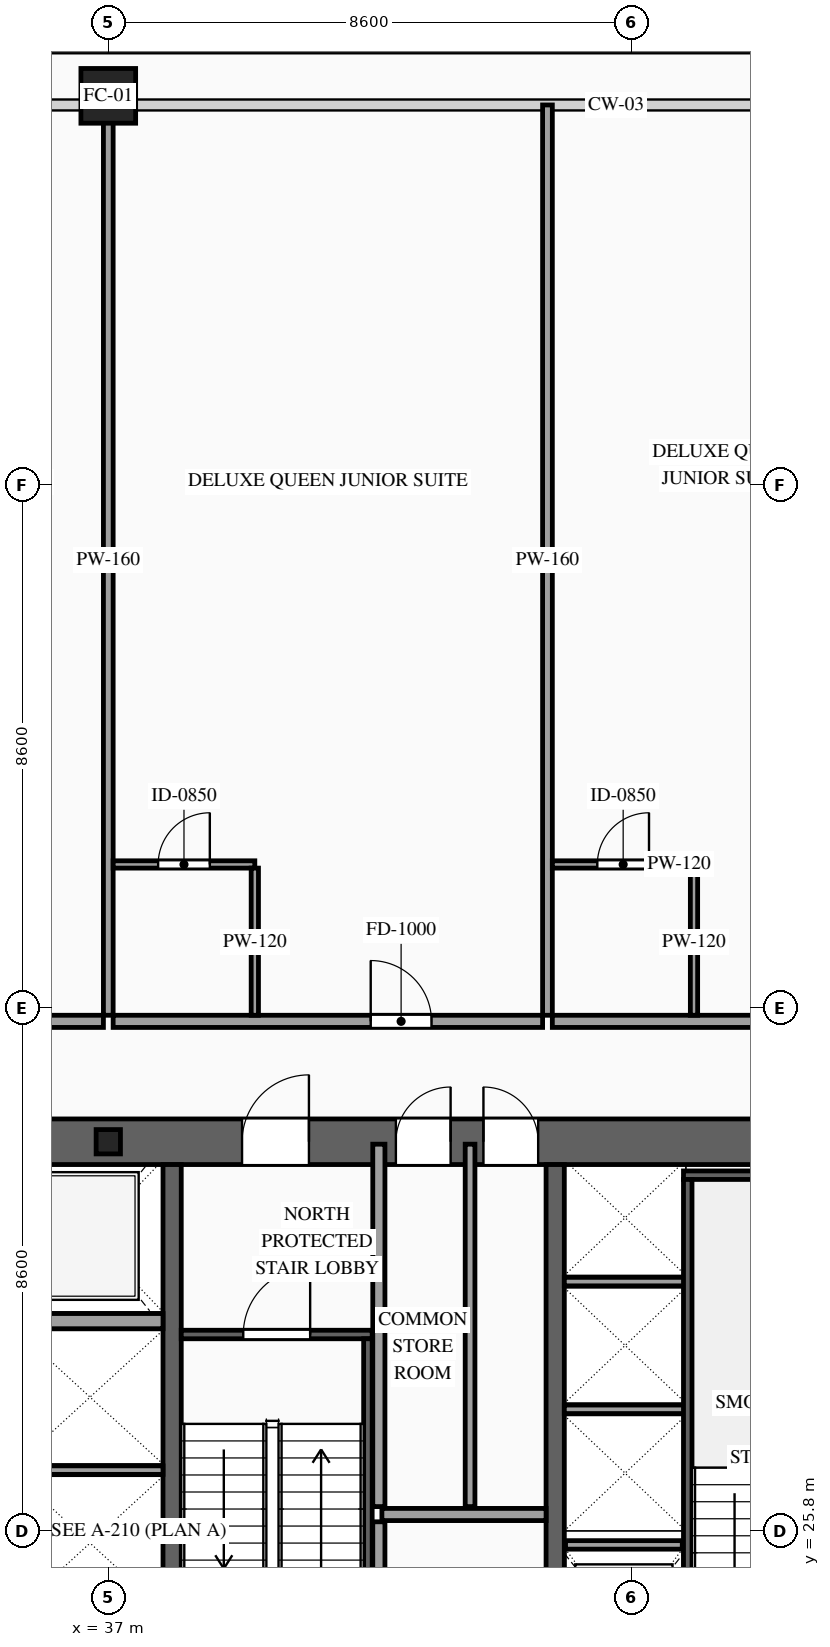
"""IFC4 building model, lengths in metres.
Left out: names, types, materials, properties, quantities, classifications, styles, units other than length and angle.
Written with IfcOpenShell. Run it as: python <this file> out.ifc"""

import sys

from ifc_helpers import new_model, si_unit, direction, frame, frame_2d, origin, origin_2d, place, context, subcontext, project, spatial, rectangle, hollow_rectangle, i_section, extrude, source, transform, mapped, element, fill, save


model = new_model("IFC4")
c1 = context("Model", 3, precision=1e-05, world=origin(), true_north=direction((0.0, 1.0)))
c2 = subcontext(c1, "Body", "Model", "MODEL_VIEW")
j1 = project(units=[si_unit("LENGTHUNIT", "METRE"), si_unit("PLANEANGLEUNIT", "RADIAN")], contexts=[c1])
p1 = place(None, origin())
s1 = spatial("IfcSite", under=j1, at=p1, CompositionType="ELEMENT")
p2 = place(p1, origin())
s2 = spatial("IfcBuilding", under=s1, at=p2, CompositionType="ELEMENT")
p3 = place(p2, frame((0.0, 0.0, 159.6)))
s3 = spatial("IfcBuildingStorey", under=s2, at=p3, CompositionType="ELEMENT", Elevation=159.6)
p4 = place(p3, frame((23.425, 32.2, 0.0), z_axis=(0.0, 0.0, 1.0), x_axis=(1.0, 0.0, 0.0)))
e1 = element("IfcWall", 1, at=p4, inside=s3, PredefinedType="SHEAR", context=c2, shape_type="SweptSolid", body=[
    extrude(rectangle(XDim=27.15, YDim=0.75, at=frame_2d((13.575, 0.0))), origin(), (0.0, 0.0, 1.0), 3.6),
])
p5 = place(p4, frame((4.645, 0.0, 0.0)))
e2 = element("IfcOpeningElement", 2, at=p5, cuts=e1, PredefinedType="OPENING", context=c2, shape_type="SweptSolid", body=[
    extrude(rectangle(XDim=0.9, YDim=2.15, at=frame_2d((0.45, 1.075))), frame((0.0, 0.39, 0.0), z_axis=(0.0, -1.0, 0.0), x_axis=(1.0, 0.0, 0.0)), (0.0, 0.0, 1.0), 0.78),
])
p6 = place(p4, frame((9.925, 0.0, 0.0)))
e3 = element("IfcOpeningElement", 3, at=p6, cuts=e1, PredefinedType="OPENING", context=c2, shape_type="SweptSolid", body=[
    extrude(rectangle(XDim=1.1, YDim=2.2, at=frame_2d((0.55, 1.1))), frame((0.0, 0.39, 0.0), z_axis=(0.0, -1.0, 0.0), x_axis=(1.0, 0.0, 0.0)), (0.0, 0.0, 1.0), 0.78),
])
p7 = place(p4, frame((15.775, 0.0, 0.0)))
e4 = element("IfcOpeningElement", 4, at=p7, cuts=e1, PredefinedType="OPENING", context=c2, shape_type="SweptSolid", body=[
    extrude(rectangle(XDim=1.1, YDim=2.2, at=frame_2d((0.55, 1.1))), frame((0.0, 0.39, 0.0), z_axis=(0.0, -1.0, 0.0), x_axis=(1.0, 0.0, 0.0)), (0.0, 0.0, 1.0), 0.78),
])
p8 = place(p4, frame((18.305, 0.0, 0.0)))
e5 = element("IfcOpeningElement", 5, at=p8, cuts=e1, PredefinedType="OPENING", context=c2, shape_type="SweptSolid", body=[
    extrude(rectangle(XDim=0.9, YDim=2.15, at=frame_2d((0.45, 1.075))), frame((0.0, 0.39, 0.0), z_axis=(0.0, -1.0, 0.0), x_axis=(1.0, 0.0, 0.0)), (0.0, 0.0, 1.0), 0.78),
])
p9 = place(p4, frame((19.745, 0.0, 0.0)))
e6 = element("IfcOpeningElement", 6, at=p9, cuts=e1, PredefinedType="OPENING", context=c2, shape_type="SweptSolid", body=[
    extrude(rectangle(XDim=0.9, YDim=2.15, at=frame_2d((0.45, 1.075))), frame((0.0, 0.39, 0.0), z_axis=(0.0, -1.0, 0.0), x_axis=(1.0, 0.0, 0.0)), (0.0, 0.0, 1.0), 0.78),
])
m1 = source(origin(), c2, "Body", "SweptSolid", [
    extrude(rectangle(XDim=12.05, YDim=0.3, at=frame_2d((6.025, 0.0))), origin(), (0.0, 0.0, 1.0), 3.6),
])
for number, where, z_axis, x_axis in (
    (7, (38.05, 19.775, 0.0), (0.0, 0.0, 1.0), (0.0, 1.0, 0.0)),
    (8, (44.35, 19.775, 0.0), (0.0, 0.0, 1.0), (0.0, 1.0, 0.0)),
):
    element("IfcWall", number, at=place(p3, frame(where, z_axis=z_axis, x_axis=x_axis)), inside=s3, PredefinedType="SOLIDWALL", context=c2, shape_type="MappedRepresentation", body=[
        mapped(m1, transform((0.0, 0.0, 0.0), scale=1.0)),
    ])
m2 = source(origin(), c2, "Body", "SweptSolid", [
    extrude(i_section(OverallWidth=0.4, OverallDepth=0.4, WebThickness=0.013, FlangeThickness=0.021, at=origin_2d()), origin(), (0.0, 0.0, 1.0), 3.6),
])
p10 = place(p3, frame((37.0, 32.2, 0.0), z_axis=(0.0, 0.0, 1.0), x_axis=(1.0, 0.0, 0.0)))
e9 = element("IfcColumn", 9, at=p10, inside=s3, PredefinedType="COLUMN", context=c2, shape_type="MappedRepresentation", body=[
    mapped(m2, transform((0.0, 0.0, 0.0), scale=1.0)),
])
m3 = source(origin(), c2, "Body", "SweptSolid", [
    extrude(hollow_rectangle(XDim=0.9, YDim=0.9, WallThickness=0.042, at=origin_2d()), origin(), (0.0, 0.0, 1.0), 3.6),
])
p11 = place(p3, frame((37.0, 49.4, 0.0), z_axis=(0.0, 0.0, 1.0), x_axis=(1.0, 0.0, 0.0)))
e10 = element("IfcColumn", 10, at=p11, inside=s3, PredefinedType="COLUMN", context=c2, shape_type="MappedRepresentation", body=[
    mapped(m3, transform((0.0, 0.0, 0.0), scale=1.0)),
])
m4 = source(origin(), c2, "Body", "SweptSolid", [
    extrude(rectangle(XDim=1.92, YDim=0.14, at=frame_2d((0.96, 0.0))), origin(), (0.0, 0.0, 1.0), 3.38),
])
p12 = place(p3, frame((44.52, 25.57, 0.0), z_axis=(0.0, 0.0, 1.0), x_axis=(1.0, 0.0, 0.0)))
e11 = element("IfcWall", 11, at=p12, inside=s3, PredefinedType="SOLIDWALL", context=c2, shape_type="MappedRepresentation", body=[
    mapped(m4, transform((0.0, 0.0, 0.0), scale=1.0)),
])
m5 = source(origin(), c2, "Body", "SweptSolid", [
    extrude(rectangle(XDim=2.4, YDim=0.14, at=frame_2d((1.2, 0.0))), origin(), (0.0, 0.0, 1.0), 3.38),
])
p13 = place(p3, frame((35.5, 26.8, 0.0), z_axis=(0.0, 0.0, 1.0), x_axis=(1.0, 0.0, 0.0)))
e12 = element("IfcWall", 12, at=p13, inside=s3, PredefinedType="SOLIDWALL", context=c2, shape_type="MappedRepresentation", body=[
    mapped(m5, transform((0.0, 0.0, 0.0), scale=1.0)),
])
m6 = source(origin(), c2, "Body", "SweptSolid", [
    extrude(rectangle(XDim=2.4, YDim=0.25, at=frame_2d((1.2, 0.0))), origin(), (0.0, 0.0, 1.0), 3.38),
])
p14 = place(p3, frame((35.5, 29.25, 0.0), z_axis=(0.0, 0.0, 1.0), x_axis=(1.0, 0.0, 0.0)))
e13 = element("IfcWall", 13, at=p14, inside=s3, PredefinedType="SOLIDWALL", context=c2, shape_type="MappedRepresentation", body=[
    mapped(m6, transform((0.0, 0.0, 0.0), scale=1.0)),
])
m7 = source(origin(), c2, "Body", "SweptSolid", [
    extrude(rectangle(XDim=2.0, YDim=0.14, at=frame_2d((1.0, 0.0))), origin(), (0.0, 0.0, 1.0), 3.38),
])
for number, where, z_axis, x_axis in (
    (14, (44.5, 27.8, 0.0), (0.0, 0.0, 1.0), (1.0, 0.0, 0.0)),
    (15, (44.5, 29.9, 0.0), (0.0, 0.0, 1.0), (1.0, 0.0, 0.0)),
):
    element("IfcWall", number, at=place(p3, frame(where, z_axis=z_axis, x_axis=x_axis)), inside=s3, PredefinedType="SOLIDWALL", context=c2, shape_type="MappedRepresentation", body=[
        mapped(m7, transform((0.0, 0.0, 0.0), scale=1.0)),
    ])
m8 = source(origin(), c2, "Body", "SweptSolid", [
    extrude(rectangle(XDim=3.28, YDim=0.14, at=frame_2d((1.64, 0.0))), origin(), (0.0, 0.0, 1.0), 3.38),
])
p15 = place(p3, frame((46.46, 31.65, 0.0), z_axis=(0.0, 0.0, 1.0), x_axis=(1.0, 0.0, 0.0)))
e16 = element("IfcWall", 16, at=p15, inside=s3, PredefinedType="SOLIDWALL", context=c2, shape_type="MappedRepresentation", body=[
    mapped(m8, transform((0.0, 0.0, 0.0), scale=1.0)),
])
m9 = source(origin(), c2, "Body", "SweptSolid", [
    extrude(rectangle(XDim=8.94, YDim=0.14, at=frame_2d((4.47, 0.0))), origin(), (0.0, 0.0, 1.0), 3.38),
])
p16 = place(p3, frame((46.53, 22.64, 0.0), z_axis=(0.0, 0.0, 1.0), x_axis=(0.0, 1.0, 0.0)))
e17 = element("IfcWall", 17, at=p16, inside=s3, PredefinedType="SOLIDWALL", context=c2, shape_type="MappedRepresentation", body=[
    mapped(m9, transform((0.0, 0.0, 0.0), scale=1.0)),
])
p17 = place(p3, frame((38.2, 29.03, 0.0), z_axis=(0.0, 0.0, 1.0), x_axis=(1.0, 0.0, 0.0)))
e18 = element("IfcWall", 18, at=p17, inside=s3, PredefinedType="SOLIDWALL", context=c2, shape_type="SweptSolid", body=[
    extrude(rectangle(XDim=3.14, YDim=0.14, at=frame_2d((1.57, 0.0))), origin(), (0.0, 0.0, 1.0), 3.38),
])
p18 = place(p17, frame((1.02, 0.0, 0.0)))
e19 = element("IfcOpeningElement", 19, at=p18, cuts=e18, PredefinedType="OPENING", context=c2, shape_type="SweptSolid", body=[
    extrude(rectangle(XDim=1.1, YDim=2.2, at=frame_2d((0.55, 1.1))), frame((0.0, 0.085, 0.0), z_axis=(0.0, -1.0, 0.0), x_axis=(1.0, 0.0, 0.0)), (0.0, 0.0, 1.0), 0.17),
])
m10 = source(origin(), c2, "Body", "SweptSolid", [
    extrude(rectangle(XDim=8.94, YDim=0.14, at=frame_2d((4.47, 0.0))), origin(), (0.0, 0.0, 1.0), 3.38),
])
p19 = place(p3, frame((41.27, 20.02, 0.0), z_axis=(0.0, 0.0, 1.0), x_axis=(0.0, 1.0, 0.0)))
e20 = element("IfcWall", 20, at=p19, inside=s3, PredefinedType="SOLIDWALL", context=c2, shape_type="MappedRepresentation", body=[
    mapped(m10, transform((0.0, 0.0, 0.0), scale=1.0)),
])
m11 = source(origin(), c2, "Body", "SweptSolid", [
    extrude(rectangle(XDim=6.51, YDim=0.2, at=frame_2d((3.255, 0.0))), origin(), (0.0, 0.0, 1.0), 3.38),
])
p20 = place(p3, frame((41.45, 19.44, 0.0), z_axis=(0.0, 0.0, 1.0), x_axis=(0.0, 1.0, 0.0)))
e21 = element("IfcWall", 21, at=p20, inside=s3, PredefinedType="PARTITIONING", context=c2, shape_type="MappedRepresentation", body=[
    mapped(m11, transform((0.0, 0.0, 0.0), scale=1.0)),
])
m12 = source(origin(), c2, "Body", "SweptSolid", [
    extrude(rectangle(XDim=2.7, YDim=0.2, at=frame_2d((1.35, 0.0))), origin(), (0.0, 0.0, 1.0), 3.38),
])
p21 = place(p3, frame((41.5, 26.07, 0.0), z_axis=(0.0, 0.0, 1.0), x_axis=(1.0, 0.0, 0.0)))
e22 = element("IfcWall", 22, at=p21, inside=s3, PredefinedType="PARTITIONING", context=c2, shape_type="MappedRepresentation", body=[
    mapped(m12, transform((0.0, 0.0, 0.0), scale=1.0)),
])
m13 = source(origin(), c2, "Body", "SweptSolid", [
    extrude(rectangle(XDim=5.96, YDim=0.2, at=frame_2d((2.98, 0.0))), origin(), (0.0, 0.0, 1.0), 3.38),
])
p22 = place(p3, frame((41.45, 26.2, 0.0), z_axis=(0.0, 0.0, 1.0), x_axis=(0.0, 1.0, 0.0)))
e23 = element("IfcWall", 23, at=p22, inside=s3, PredefinedType="PARTITIONING", context=c2, shape_type="MappedRepresentation", body=[
    mapped(m13, transform((0.0, 0.0, 0.0), scale=1.0)),
])
m14 = source(origin(), c2, "Body", "SweptSolid", [
    extrude(rectangle(XDim=5.96, YDim=0.16, at=frame_2d((2.98, 0.0))), origin(), (0.0, 0.0, 1.0), 3.38),
])
p23 = place(p3, frame((42.95, 26.2, 0.0), z_axis=(0.0, 0.0, 1.0), x_axis=(0.0, 1.0, 0.0)))
e24 = element("IfcWall", 24, at=p23, inside=s3, PredefinedType="PARTITIONING", context=c2, shape_type="MappedRepresentation", body=[
    mapped(m14, transform((0.0, 0.0, 0.0), scale=1.0)),
])
p24 = place(p3, frame((30.597, 34.18, 0.0), z_axis=(0.0, 0.0, 1.0), x_axis=(1.0, 0.0, 0.0)))
e25 = element("IfcWall", 25, at=p24, inside=s3, PredefinedType="PARTITIONING", context=c2, shape_type="SweptSolid", body=[
    extrude(rectangle(XDim=6.323, YDim=0.2, at=frame_2d((3.162, 0.0))), origin(), (0.0, 0.0, 1.0), 3.38),
])
p25 = place(p24, frame((3.866, 0.0, 0.0)))
e26 = element("IfcOpeningElement", 26, at=p25, cuts=e25, PredefinedType="OPENING", context=c2, shape_type="SweptSolid", body=[
    extrude(rectangle(XDim=1.0, YDim=2.2, at=frame_2d((0.5, 1.1))), frame((0.0, 0.115, 0.0), z_axis=(0.0, -1.0, 0.0), x_axis=(1.0, 0.0, 0.0)), (0.0, 0.0, 1.0), 0.23),
])
m15 = source(origin(), c2, "Body", "SweptSolid", [
    extrude(rectangle(XDim=14.97, YDim=0.16, at=frame_2d((7.485, 0.0))), origin(), (0.0, 0.0, 1.0), 2.675),
])
p26 = place(p3, frame((37.0, 34.28, 0.0), z_axis=(0.0, 0.0, 1.0), x_axis=(0.0, 1.0, 0.0)))
e27 = element("IfcWall", 27, at=p26, inside=s3, PredefinedType="PARTITIONING", context=c2, shape_type="MappedRepresentation", body=[
    mapped(m15, transform((0.0, 0.0, 0.0), scale=1.0)),
])
p27 = place(p3, frame((37.08, 34.18, 0.0), z_axis=(0.0, 0.0, 1.0), x_axis=(1.0, 0.0, 0.0)))
e28 = element("IfcWall", 28, at=p27, inside=s3, PredefinedType="PARTITIONING", context=c2, shape_type="SweptSolid", body=[
    extrude(rectangle(XDim=7.063, YDim=0.2, at=frame_2d((3.531, 0.0))), origin(), (0.0, 0.0, 1.0), 3.38),
])
p28 = place(p27, frame((4.236, 0.0, 0.0)))
e29 = element("IfcOpeningElement", 29, at=p28, cuts=e28, PredefinedType="OPENING", context=c2, shape_type="SweptSolid", body=[
    extrude(rectangle(XDim=1.0, YDim=2.2, at=frame_2d((0.5, 1.1))), frame((0.0, 0.115, 0.0), z_axis=(0.0, -1.0, 0.0), x_axis=(1.0, 0.0, 0.0)), (0.0, 0.0, 1.0), 0.23),
])
m16 = source(origin(), c2, "Body", "SweptSolid", [
    extrude(rectangle(XDim=14.97, YDim=0.16, at=frame_2d((7.485, 0.0))), origin(), (0.0, 0.0, 1.0), 3.38),
])
p29 = place(p3, frame((44.223, 34.28, 0.0), z_axis=(0.0, 0.0, 1.0), x_axis=(0.0, 1.0, 0.0)))
e30 = element("IfcWall", 30, at=p29, inside=s3, PredefinedType="PARTITIONING", context=c2, shape_type="MappedRepresentation", body=[
    mapped(m16, transform((0.0, 0.0, 0.0), scale=1.0)),
])
p30 = place(p3, frame((37.08, 36.76, 0.0), z_axis=(0.0, 0.0, 1.0), x_axis=(1.0, 0.0, 0.0)))
e31 = element("IfcWall", 31, at=p30, inside=s3, PredefinedType="PARTITIONING", context=c2, shape_type="SweptSolid", body=[
    extrude(rectangle(XDim=2.33, YDim=0.12, at=frame_2d((1.165, 0.0))), origin(), (0.0, 0.0, 1.0), 3.38),
])
p31 = place(p30, frame((0.74, 0.0, 0.0)))
e32 = element("IfcOpeningElement", 32, at=p31, cuts=e31, PredefinedType="OPENING", context=c2, shape_type="SweptSolid", body=[
    extrude(rectangle(XDim=0.85, YDim=2.1, at=frame_2d((0.425, 1.05))), frame((0.0, 0.075, 0.0), z_axis=(0.0, -1.0, 0.0), x_axis=(1.0, 0.0, 0.0)), (0.0, 0.0, 1.0), 0.15),
])
m17 = source(origin(), c2, "Body", "SweptSolid", [
    extrude(rectangle(XDim=2.42, YDim=0.12, at=frame_2d((1.21, 0.0))), origin(), (0.0, 0.0, 1.0), 3.38),
])
p32 = place(p3, frame((39.41, 34.28, 0.0), z_axis=(0.0, 0.0, 1.0), x_axis=(0.0, 1.0, 0.0)))
e33 = element("IfcWall", 33, at=p32, inside=s3, PredefinedType="PARTITIONING", context=c2, shape_type="MappedRepresentation", body=[
    mapped(m17, transform((0.0, 0.0, 0.0), scale=1.0)),
])
p33 = place(p3, frame((44.303, 34.18, 0.0), z_axis=(0.0, 0.0, 1.0), x_axis=(1.0, 0.0, 0.0)))
e34 = element("IfcWall", 34, at=p33, inside=s3, PredefinedType="PARTITIONING", context=c2, shape_type="SweptSolid", body=[
    extrude(rectangle(XDim=5.707, YDim=0.2, at=frame_2d((2.854, 0.0))), origin(), (0.0, 0.0, 1.0), 3.38),
])
p34 = place(p33, frame((3.558, 0.0, 0.0)))
e35 = element("IfcOpeningElement", 35, at=p34, cuts=e34, PredefinedType="OPENING", context=c2, shape_type="SweptSolid", body=[
    extrude(rectangle(XDim=1.0, YDim=2.2, at=frame_2d((0.5, 1.1))), frame((0.0, 0.115, 0.0), z_axis=(0.0, -1.0, 0.0), x_axis=(1.0, 0.0, 0.0)), (0.0, 0.0, 1.0), 0.23),
])
p35 = place(p3, frame((44.303, 36.76, 0.0), z_axis=(0.0, 0.0, 1.0), x_axis=(1.0, 0.0, 0.0)))
e36 = element("IfcWall", 36, at=p35, inside=s3, PredefinedType="PARTITIONING", context=c2, shape_type="SweptSolid", body=[
    extrude(rectangle(XDim=2.33, YDim=0.12, at=frame_2d((1.165, 0.0))), origin(), (0.0, 0.0, 1.0), 3.38),
])
p36 = place(p35, frame((0.74, 0.0, 0.0)))
e37 = element("IfcOpeningElement", 37, at=p36, cuts=e36, PredefinedType="OPENING", context=c2, shape_type="SweptSolid", body=[
    extrude(rectangle(XDim=0.85, YDim=2.1, at=frame_2d((0.425, 1.05))), frame((0.0, 0.075, 0.0), z_axis=(0.0, -1.0, 0.0), x_axis=(1.0, 0.0, 0.0)), (0.0, 0.0, 1.0), 0.15),
])
p37 = place(p3, frame((46.633, 34.28, 0.0), z_axis=(0.0, 0.0, 1.0), x_axis=(0.0, 1.0, 0.0)))
e38 = element("IfcWall", 38, at=p37, inside=s3, PredefinedType="PARTITIONING", context=c2, shape_type="MappedRepresentation", body=[
    mapped(m17, transform((0.0, 0.0, 0.0), scale=1.0)),
])
m18 = source(origin(), c2, "Body", "SweptSolid", [
    extrude(rectangle(XDim=1.1, YDim=2.2, at=frame_2d((0.55, 1.1))), frame((0.0, 0.025, 0.0), z_axis=(0.0, -1.0, 0.0), x_axis=(1.0, 0.0, 0.0)), (0.0, 0.0, 1.0), 0.05),
])
p38 = place(p18, origin())
e39 = element("IfcDoor", 39, at=p38, inside=s3, OperationType="SINGLE_SWING_RIGHT", PredefinedType="DOOR", context=c2, shape_type="MappedRepresentation", body=[
    mapped(m18, transform((0.0, 0.0, 0.0), scale=1.0)),
])
fill(e19, e39)
p39 = place(p7, origin())
e40 = element("IfcDoor", 40, at=p39, inside=s3, OperationType="SINGLE_SWING_RIGHT", PredefinedType="DOOR", context=c2, shape_type="MappedRepresentation", body=[
    mapped(m18, transform((0.0, 0.0, 0.0), scale=1.0)),
])
fill(e4, e40)
m19 = source(origin(), c2, "Body", "SweptSolid", [
    extrude(rectangle(XDim=0.9, YDim=2.15, at=frame_2d((0.45, 1.075))), frame((0.0, 0.025, 0.0), z_axis=(0.0, -1.0, 0.0), x_axis=(1.0, 0.0, 0.0)), (0.0, 0.0, 1.0), 0.05),
])
p40 = place(p8, origin())
e41 = element("IfcDoor", 41, at=p40, inside=s3, OperationType="SINGLE_SWING_RIGHT", PredefinedType="DOOR", context=c2, shape_type="MappedRepresentation", body=[
    mapped(m19, transform((0.0, 0.0, 0.0), scale=1.0)),
])
fill(e5, e41)
p41 = place(p9, origin())
e42 = element("IfcDoor", 42, at=p41, inside=s3, OperationType="SINGLE_SWING_LEFT", PredefinedType="DOOR", context=c2, shape_type="MappedRepresentation", body=[
    mapped(m19, transform((0.0, 0.0, 0.0), scale=1.0)),
])
fill(e6, e42)
m20 = source(origin(), c2, "Body", "SweptSolid", [
    extrude(rectangle(XDim=1.0, YDim=2.2, at=frame_2d((0.5, 1.1))), frame((0.0, 0.025, 0.0), z_axis=(0.0, -1.0, 0.0), x_axis=(1.0, 0.0, 0.0)), (0.0, 0.0, 1.0), 0.05),
])
p42 = place(p28, origin())
e43 = element("IfcDoor", 43, at=p42, inside=s3, OperationType="SINGLE_SWING_LEFT", PredefinedType="DOOR", context=c2, shape_type="MappedRepresentation", body=[
    mapped(m20, transform((0.0, 0.0, 0.0), scale=1.0)),
])
fill(e29, e43)
m21 = source(origin(), c2, "Body", "SweptSolid", [
    extrude(rectangle(XDim=0.85, YDim=2.1, at=frame_2d((0.425, 1.05))), frame((0.0, 0.025, 0.0), z_axis=(0.0, -1.0, 0.0), x_axis=(1.0, 0.0, 0.0)), (0.0, 0.0, 1.0), 0.05),
])
p43 = place(p31, origin())
e44 = element("IfcDoor", 44, at=p43, inside=s3, OperationType="SINGLE_SWING_RIGHT", PredefinedType="DOOR", context=c2, shape_type="MappedRepresentation", body=[
    mapped(m21, transform((0.0, 0.0, 0.0), scale=1.0)),
])
fill(e32, e44)
p44 = place(p36, origin())
e45 = element("IfcDoor", 45, at=p44, inside=s3, OperationType="SINGLE_SWING_RIGHT", PredefinedType="DOOR", context=c2, shape_type="MappedRepresentation", body=[
    mapped(m21, transform((0.0, 0.0, 0.0), scale=1.0)),
])
fill(e37, e45)
save(model, sys.argv[1])
